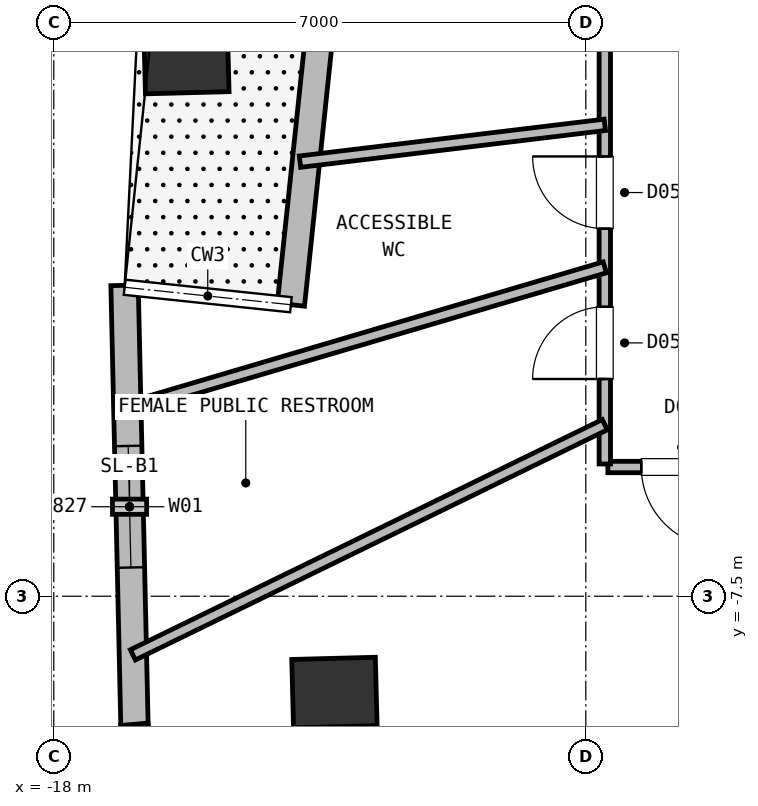
"""IFC4 building model, lengths in metres.
Left out: names, types, materials, properties, quantities, classifications, styles, units other than length and angle.
Written with IfcOpenShell. Run it as: python <this file> out.ifc"""

import sys

from ifc_helpers import new_model, si_unit, direction, frame, frame_2d, origin, origin_2d, place, context, subcontext, project, spatial, rectangle, extrude, element, fill, save


model = new_model("IFC4")
c1 = context("Model", 3, precision=1e-05, world=origin(), true_north=direction((0.0, 1.0)))
c2 = subcontext(c1, "Body", "Model", "MODEL_VIEW")
j1 = project(units=[si_unit("LENGTHUNIT", "METRE"), si_unit("PLANEANGLEUNIT", "RADIAN")], contexts=[c1])
p1 = place(None, origin())
s1 = spatial("IfcSite", under=j1, at=p1, CompositionType="ELEMENT")
p2 = place(p1, origin())
s2 = spatial("IfcBuilding", under=s1, at=p2, CompositionType="ELEMENT")
p3 = place(p2, frame((0.0, 0.0, 101.0)))
s3 = spatial("IfcBuildingStorey", under=s2, at=p3, CompositionType="ELEMENT", Elevation=101.0)
for number, where, z_axis, x_axis in (
    (1, (-16.255, -0.426, 0.0), (0.0, 0.0, 1.0), (-0.026, 1.0, 0.0)),
    (2, (-14.307, -8.768, 0.0), (0.0, 0.0, 1.0), (-0.026, 1.0, 0.0)),
):
    element("IfcColumn", number, at=place(p3, frame(where, z_axis=z_axis, x_axis=x_axis)), inside=s3, PredefinedType="COLUMN", context=c2, shape_type="SweptSolid", body=[
        extrude(rectangle(XDim=0.9, YDim=1.1, at=origin_2d()), origin(), (0.0, 0.0, 1.0), 3.75),
    ])
p4 = place(p3, frame((-14.88, -3.665, 0.0), z_axis=(0.0, 0.0, 1.0), x_axis=(0.104508820017, 0.994523959761, 0.0)))
e3 = element("IfcWall", 3, at=p4, inside=s3, PredefinedType="SOLIDWALL", context=c2, shape_type="SweptSolid", body=[
    extrude(rectangle(XDim=10.4, YDim=0.36, at=frame_2d((5.2, 0.0))), origin(), (0.0, 0.0, 1.0), 3.5),
])
p5 = place(p4, frame((4.375, 0.0, 0.0)))
e4 = element("IfcOpeningElement", 4, at=p5, cuts=e3, PredefinedType="OPENING", context=c2, shape_type="SweptSolid", body=[
    extrude(rectangle(XDim=1.65, YDim=2.25, at=frame_2d((0.825, 1.125))), frame((0.0, 0.19, 0.0), z_axis=(0.0, -1.0, 0.0), x_axis=(1.0, 0.0, 0.0)), (0.0, 0.0, 1.0), 0.38),
])
p6 = place(p3, frame((-16.937, -9.235, 0.0), z_axis=(0.0, 0.0, 1.0), x_axis=(-0.022541523753, 0.999745907572, 0.0)))
e5 = element("IfcWall", 5, at=p6, inside=s3, PredefinedType="SOLIDWALL", context=c2, shape_type="SweptSolid", body=[
    extrude(rectangle(XDim=5.827, YDim=0.36, at=frame_2d((2.914, 0.0))), origin(), (0.0, 0.0, 1.0), 3.5),
])
p7 = place(p6, frame((2.113, 0.0, 0.72)))
e6 = element("IfcOpeningElement", 6, at=p7, cuts=e5, PredefinedType="OPENING", context=c2, shape_type="SweptSolid", body=[
    extrude(rectangle(XDim=1.6, YDim=1.88, at=frame_2d((0.8, 0.94))), frame((0.0, 0.19, 0.0), z_axis=(0.0, -1.0, 0.0), x_axis=(1.0, 0.0, 0.0)), (0.0, 0.0, 1.0), 0.38),
])
p8 = place(p3, frame((-16.708, -11.845, 0.0), z_axis=(0.0, 0.0, 1.0), x_axis=(-0.086700653562, 0.996234408496, 0.0)))
e7 = element("IfcWall", 7, at=p8, inside=s3, PredefinedType="SOLIDWALL", context=c2, shape_type="SweptSolid", body=[
    extrude(rectangle(XDim=2.669, YDim=0.36, at=frame_2d((1.335, 0.0))), origin(), (0.0, 0.0, 1.0), 3.5),
])
p9 = place(p8, frame((0.635, 0.0, 0.72)))
e8 = element("IfcOpeningElement", 8, at=p9, cuts=e7, PredefinedType="OPENING", context=c2, shape_type="SweptSolid", body=[
    extrude(rectangle(XDim=1.4, YDim=1.84, at=frame_2d((0.7, 0.92))), frame((0.0, 0.19, 0.0), z_axis=(0.0, -1.0, 0.0), x_axis=(1.0, 0.0, 0.0)), (0.0, 0.0, 1.0), 0.38),
])
p10 = place(p3, frame((-8.69, -5.8, 0.0), z_axis=(0.0, 0.0, 1.0), x_axis=(-1.0, 0.0, 0.0)))
e9 = element("IfcWall", 9, at=p10, inside=s3, PredefinedType="PARTITIONING", context=c2, shape_type="SweptSolid", body=[
    extrude(rectangle(XDim=2.02, YDim=0.15, at=frame_2d((1.01, 0.0))), origin(), (0.0, 0.0, 1.0), 3.5),
])
p11 = place(p10, frame((0.52, 0.0, 0.0)))
e10 = element("IfcOpeningElement", 10, at=p11, cuts=e9, PredefinedType="OPENING", context=c2, shape_type="SweptSolid", body=[
    extrude(rectangle(XDim=1.06, YDim=2.15, at=frame_2d((0.53, 1.075))), frame((0.0, 0.085, 0.0), z_axis=(0.0, -1.0, 0.0), x_axis=(1.0, 0.0, 0.0)), (0.0, 0.0, 1.0), 0.17),
])
p12 = place(p3, frame((-10.75, -5.76, 0.0), z_axis=(0.0, 0.0, 1.0), x_axis=(0.0, 1.0, 0.0)))
e11 = element("IfcWall", 11, at=p12, inside=s3, PredefinedType="PARTITIONING", context=c2, shape_type="SweptSolid", body=[
    extrude(rectangle(XDim=12.92, YDim=0.15, at=frame_2d((6.46, 0.0))), origin(), (0.0, 0.0, 1.0), 3.5),
])
p13 = place(p12, frame((3.096, 0.0, 0.0)))
e12 = element("IfcOpeningElement", 12, at=p13, cuts=e11, PredefinedType="OPENING", context=c2, shape_type="SweptSolid", body=[
    extrude(rectangle(XDim=0.95, YDim=2.1, at=frame_2d((0.475, 1.05))), frame((0.0, 0.085, 0.0), z_axis=(0.0, -1.0, 0.0), x_axis=(1.0, 0.0, 0.0)), (0.0, 0.0, 1.0), 0.17),
])
p14 = place(p12, frame((1.118, 0.0, 0.0)))
e13 = element("IfcOpeningElement", 13, at=p14, cuts=e11, PredefinedType="OPENING", context=c2, shape_type="SweptSolid", body=[
    extrude(rectangle(XDim=0.95, YDim=2.1, at=frame_2d((0.475, 1.05))), frame((0.0, 0.085, 0.0), z_axis=(0.0, -1.0, 0.0), x_axis=(1.0, 0.0, 0.0)), (0.0, 0.0, 1.0), 0.17),
])
p15 = place(p12, frame((7.699, 0.0, 0.0)))
e14 = element("IfcOpeningElement", 14, at=p15, cuts=e11, PredefinedType="OPENING", context=c2, shape_type="SweptSolid", body=[
    extrude(rectangle(XDim=1.0, YDim=2.15, at=frame_2d((0.5, 1.075))), frame((0.0, 0.085, 0.0), z_axis=(0.0, -1.0, 0.0), x_axis=(1.0, 0.0, 0.0)), (0.0, 0.0, 1.0), 0.17),
])
p16 = place(p12, frame((11.819, 0.0, 0.0)))
e15 = element("IfcOpeningElement", 15, at=p16, cuts=e11, PredefinedType="OPENING", context=c2, shape_type="SweptSolid", body=[
    extrude(rectangle(XDim=1.0, YDim=2.15, at=frame_2d((0.5, 1.075))), frame((0.0, 0.085, 0.0), z_axis=(0.0, -1.0, 0.0), x_axis=(1.0, 0.0, 0.0)), (0.0, 0.0, 1.0), 0.17),
])
p17 = place(p3, frame((-10.75, -5.243, 0.0), z_axis=(0.0, 0.0, 1.0), x_axis=(-0.898794257847, -0.438370713052, 0.0)))
e16 = element("IfcWall", 16, at=p17, inside=s3, PredefinedType="PARTITIONING", context=c2, shape_type="SweptSolid", body=[
    extrude(rectangle(XDim=6.908, YDim=0.15, at=frame_2d((3.454, 0.0))), origin(), (0.0, 0.0, 1.0), 3.5),
])
p18 = place(p3, frame((-10.75, -1.298, 0.0), z_axis=(0.0, 0.0, 1.0), x_axis=(-0.992792513818, -0.119845836422, 0.0)))
e17 = element("IfcWall", 17, at=p18, inside=s3, PredefinedType="PARTITIONING", context=c2, shape_type="SweptSolid", body=[
    extrude(rectangle(XDim=4.04, YDim=0.15, at=frame_2d((2.02, 0.0))), origin(), (0.0, 0.0, 1.0), 3.5),
])
p19 = place(p3, frame((-10.75, -3.173, 0.0), z_axis=(0.0, 0.0, 1.0), x_axis=(-0.959115252186, -0.283015782288, 0.0)))
e18 = element("IfcWall", 18, at=p19, inside=s3, PredefinedType="PARTITIONING", context=c2, shape_type="SweptSolid", body=[
    extrude(rectangle(XDim=6.55, YDim=0.15, at=frame_2d((3.275, 0.0))), origin(), (0.0, 0.0, 1.0), 3.5),
])
p20 = place(p7, origin())
e19 = element("IfcWindow", 19, at=p20, inside=s3, PartitioningType="SINGLE_PANEL", PredefinedType="WINDOW", context=c2, shape_type="SweptSolid", body=[
    extrude(rectangle(XDim=1.6, YDim=1.88, at=frame_2d((0.8, 0.94))), frame((0.0, 0.03, 0.0), z_axis=(0.0, -1.0, 0.0), x_axis=(1.0, 0.0, 0.0)), (0.0, 0.0, 1.0), 0.06),
])
fill(e6, e19)
p21 = place(p13, origin())
e20 = element("IfcDoor", 20, at=p21, inside=s3, OperationType="SINGLE_SWING_RIGHT", PredefinedType="DOOR", context=c2, shape_type="SweptSolid", body=[
    extrude(rectangle(XDim=0.95, YDim=2.1, at=frame_2d((0.475, 1.05))), frame((0.0, 0.025, 0.0), z_axis=(0.0, -1.0, 0.0), x_axis=(1.0, 0.0, 0.0)), (0.0, 0.0, 1.0), 0.05),
])
fill(e12, e20)
p22 = place(p14, origin())
e21 = element("IfcDoor", 21, at=p22, inside=s3, OperationType="SINGLE_SWING_LEFT", PredefinedType="DOOR", context=c2, shape_type="SweptSolid", body=[
    extrude(rectangle(XDim=0.95, YDim=2.1, at=frame_2d((0.475, 1.05))), frame((0.0, 0.025, 0.0), z_axis=(0.0, -1.0, 0.0), x_axis=(1.0, 0.0, 0.0)), (0.0, 0.0, 1.0), 0.05),
])
fill(e13, e21)
p23 = place(p11, origin())
e22 = element("IfcDoor", 22, at=p23, inside=s3, OperationType="SINGLE_SWING_LEFT", PredefinedType="DOOR", context=c2, shape_type="SweptSolid", body=[
    extrude(rectangle(XDim=1.06, YDim=2.15, at=frame_2d((0.53, 1.075))), frame((0.0, 0.025, 0.0), z_axis=(0.0, -1.0, 0.0), x_axis=(1.0, 0.0, 0.0)), (0.0, 0.0, 1.0), 0.05),
])
fill(e10, e22)
save(model, sys.argv[1])
